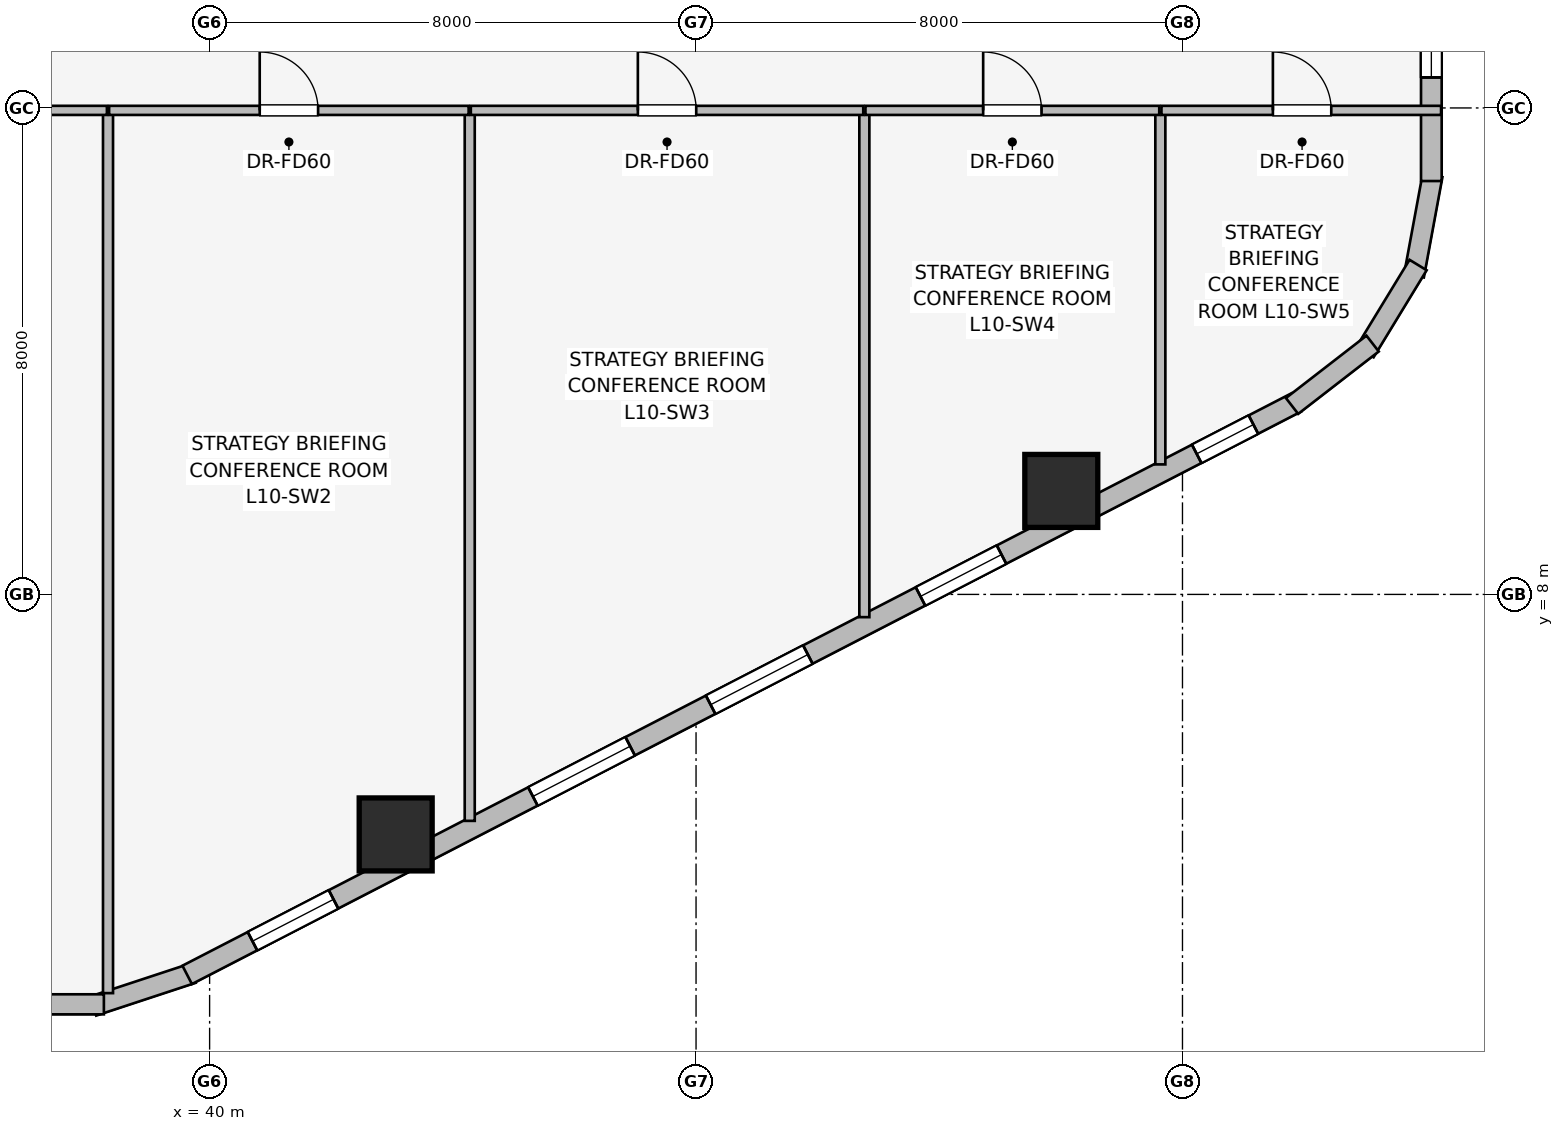
"""IFC4 building model, lengths in metres.
Left out: names, types, materials, properties, quantities, classifications, styles, units other than length and angle.
Written with IfcOpenShell. Run it as: python <this file> out.ifc"""

import sys

from ifc_helpers import new_model, si_unit, direction, frame, frame_2d, origin, origin_2d, place, context, subcontext, project, spatial, rectangle, extrude, element, fill, save


model = new_model("IFC4")
c1 = context("Model", 3, precision=1e-05, world=origin(), true_north=direction((0.0, 1.0)))
c2 = subcontext(c1, "Body", "Model", "MODEL_VIEW")
j1 = project(units=[si_unit("LENGTHUNIT", "METRE"), si_unit("PLANEANGLEUNIT", "RADIAN")], contexts=[c1])
p1 = place(None, origin())
s1 = spatial("IfcSite", under=j1, at=p1, CompositionType="ELEMENT")
p2 = place(p1, origin())
s2 = spatial("IfcBuilding", under=s1, at=p2, CompositionType="ELEMENT")
p3 = place(p2, frame((0.0, 0.0, 41.6)))
s3 = spatial("IfcBuildingStorey", under=s2, at=p3, CompositionType="ELEMENT", Elevation=41.6)
for number, where, z_axis, x_axis in (
    (1, (43.06, 4.053, 0.0), (0.0, 0.0, 1.0), (1.0, 0.0, 0.0)),
    (2, (54.007, 9.702, 0.0), (0.0, 0.0, 1.0), (1.0, 0.0, 0.0)),
):
    element("IfcColumn", number, at=place(p3, frame(where, z_axis=z_axis, x_axis=x_axis)), inside=s3, PredefinedType="COLUMN", context=c2, shape_type="SweptSolid", body=[
        extrude(rectangle(XDim=1.2, YDim=1.2, at=origin_2d()), origin(), (0.0, 0.0, 1.0), 3.65),
    ])
p4 = place(p3, frame((39.719, 1.769, 0.0), z_axis=(0.0, 0.0, 1.0), x_axis=(-0.94976901097, -0.312951794691, 0.0)))
e3 = element("IfcWall", 3, at=p4, inside=s3, PredefinedType="STANDARD", context=c2, shape_type="SweptSolid", body=[
    extrude(rectangle(XDim=1.722, YDim=0.33, at=frame_2d((0.861, 0.0))), origin(), (0.0, 0.0, 1.0), 3.39),
])
p5 = place(p3, frame((38.261, 1.259, 0.0), z_axis=(0.0, 0.0, 1.0), x_axis=(-1.0, 0.0, 0.0)))
e4 = element("IfcWall", 4, at=p5, inside=s3, PredefinedType="STANDARD", context=c2, shape_type="SweptSolid", body=[
    extrude(rectangle(XDim=1.722, YDim=0.33, at=frame_2d((0.861, 0.0))), origin(), (0.0, 0.0, 1.0), 3.39),
])
p6 = place(p3, frame((57.876, 11.159, 0.0), z_axis=(0.0, 0.0, 1.0), x_axis=(-0.888634413993, -0.458616264721, 0.0)))
e5 = element("IfcWall", 5, at=p6, inside=s3, PredefinedType="STANDARD", context=c2, shape_type="SweptSolid", body=[
    extrude(rectangle(XDim=20.531, YDim=0.34, at=frame_2d((10.266, 0.0))), origin(), (0.0, 0.0, 1.0), 2.684),
])
p7 = place(p6, frame((0.798, 0.0, 0.75)))
e6 = element("IfcOpeningElement", 6, at=p7, cuts=e5, PredefinedType="OPENING", context=c2, shape_type="SweptSolid", body=[
    extrude(rectangle(XDim=1.05, YDim=1.4, at=frame_2d((0.525, 0.7))), frame((0.0, 0.18, 0.0), z_axis=(0.0, -1.0, 0.0), x_axis=(1.0, 0.0, 0.0)), (0.0, 0.0, 1.0), 0.36),
])
p8 = place(p6, frame((5.46, 0.0, 0.75)))
e7 = element("IfcOpeningElement", 7, at=p8, cuts=e5, PredefinedType="OPENING", context=c2, shape_type="SweptSolid", body=[
    extrude(rectangle(XDim=1.5, YDim=1.5, at=frame_2d((0.75, 0.75))), frame((0.0, 0.18, 0.0), z_axis=(0.0, -1.0, 0.0), x_axis=(1.0, 0.0, 0.0)), (0.0, 0.0, 1.0), 0.36),
])
p9 = place(p6, frame((9.044, 0.0, 0.75)))
e8 = element("IfcOpeningElement", 8, at=p9, cuts=e5, PredefinedType="OPENING", context=c2, shape_type="SweptSolid", body=[
    extrude(rectangle(XDim=1.8, YDim=1.5, at=frame_2d((0.9, 0.75))), frame((0.0, 0.18, 0.0), z_axis=(0.0, -1.0, 0.0), x_axis=(1.0, 0.0, 0.0)), (0.0, 0.0, 1.0), 0.36),
])
p10 = place(p6, frame((12.333, 0.0, 0.75)))
e9 = element("IfcOpeningElement", 9, at=p10, cuts=e5, PredefinedType="OPENING", context=c2, shape_type="SweptSolid", body=[
    extrude(rectangle(XDim=1.8, YDim=1.5, at=frame_2d((0.9, 0.75))), frame((0.0, 0.18, 0.0), z_axis=(0.0, -1.0, 0.0), x_axis=(1.0, 0.0, 0.0)), (0.0, 0.0, 1.0), 0.36),
])
p11 = place(p6, frame((17.823, 0.0, 0.75)))
e10 = element("IfcOpeningElement", 10, at=p11, cuts=e5, PredefinedType="OPENING", context=c2, shape_type="SweptSolid", body=[
    extrude(rectangle(XDim=1.5, YDim=1.5, at=frame_2d((0.75, 0.75))), frame((0.0, 0.18, 0.0), z_axis=(0.0, -1.0, 0.0), x_axis=(1.0, 0.0, 0.0)), (0.0, 0.0, 1.0), 0.36),
])
p12 = place(p3, frame((60.113, 14.892, 0.0), z_axis=(0.0, 0.0, 1.0), x_axis=(-0.181714143354, -0.983351397063, 0.0)))
e11 = element("IfcWall", 11, at=p12, inside=s3, PredefinedType="STANDARD", context=c2, shape_type="SweptSolid", body=[
    extrude(rectangle(XDim=1.678, YDim=0.33, at=frame_2d((0.839, 0.0))), origin(), (0.0, 0.0, 1.0), 3.39),
])
p13 = place(p3, frame((59.875, 13.417, 0.0), z_axis=(0.0, 0.0, 1.0), x_axis=(-0.520584129191, -0.853810379671, 0.0)))
e12 = element("IfcWall", 12, at=p13, inside=s3, PredefinedType="STANDARD", context=c2, shape_type="SweptSolid", body=[
    extrude(rectangle(XDim=1.677, YDim=0.33, at=frame_2d((0.838, 0.0))), origin(), (0.0, 0.0, 1.0), 3.39),
])
p14 = place(p3, frame((59.127, 12.125, 0.0), z_axis=(0.0, 0.0, 1.0), x_axis=(-0.790691856293, -0.61221433207, 0.0)))
e13 = element("IfcWall", 13, at=p14, inside=s3, PredefinedType="STANDARD", context=c2, shape_type="SweptSolid", body=[
    extrude(rectangle(XDim=1.676, YDim=0.33, at=frame_2d((0.838, 0.0))), origin(), (0.0, 0.0, 1.0), 3.39),
])
p15 = place(p3, frame((60.093, 33.202, 0.0), z_axis=(0.0, 0.0, 1.0), x_axis=(0.0, -1.0, 0.0)))
e14 = element("IfcWall", 14, at=p15, inside=s3, PredefinedType="STANDARD", context=c2, shape_type="SweptSolid", body=[
    extrude(rectangle(XDim=18.404, YDim=0.34, at=frame_2d((9.202, 0.0))), origin(), (0.0, 0.0, 1.0), 2.684),
])
p16 = place(p15, frame((1.744, 0.0, 0.75)))
e15 = element("IfcOpeningElement", 15, at=p16, cuts=e14, PredefinedType="OPENING", context=c2, shape_type="SweptSolid", body=[
    extrude(rectangle(XDim=1.05, YDim=1.4, at=frame_2d((0.525, 0.7))), frame((0.0, 0.18, 0.0), z_axis=(0.0, -1.0, 0.0), x_axis=(1.0, 0.0, 0.0)), (0.0, 0.0, 1.0), 0.36),
])
p17 = place(p15, frame((5.182, 0.0, 0.75)))
e16 = element("IfcOpeningElement", 16, at=p17, cuts=e14, PredefinedType="OPENING", context=c2, shape_type="SweptSolid", body=[
    extrude(rectangle(XDim=1.5, YDim=1.5, at=frame_2d((0.75, 0.75))), frame((0.0, 0.18, 0.0), z_axis=(0.0, -1.0, 0.0), x_axis=(1.0, 0.0, 0.0)), (0.0, 0.0, 1.0), 0.36),
])
p18 = place(p15, frame((9.058, 0.0, 0.75)))
e17 = element("IfcOpeningElement", 17, at=p18, cuts=e14, PredefinedType="OPENING", context=c2, shape_type="SweptSolid", body=[
    extrude(rectangle(XDim=1.8, YDim=1.5, at=frame_2d((0.9, 0.75))), frame((0.0, 0.18, 0.0), z_axis=(0.0, -1.0, 0.0), x_axis=(1.0, 0.0, 0.0)), (0.0, 0.0, 1.0), 0.36),
])
p19 = place(p15, frame((12.704, 0.0, 0.75)))
e18 = element("IfcOpeningElement", 18, at=p19, cuts=e14, PredefinedType="OPENING", context=c2, shape_type="SweptSolid", body=[
    extrude(rectangle(XDim=1.05, YDim=1.4, at=frame_2d((0.525, 0.7))), frame((0.0, 0.18, 0.0), z_axis=(0.0, -1.0, 0.0), x_axis=(1.0, 0.0, 0.0)), (0.0, 0.0, 1.0), 0.36),
])
p20 = place(p15, frame((15.65, 0.0, 0.75)))
e19 = element("IfcOpeningElement", 19, at=p20, cuts=e14, PredefinedType="OPENING", context=c2, shape_type="SweptSolid", body=[
    extrude(rectangle(XDim=1.05, YDim=1.4, at=frame_2d((0.525, 0.7))), frame((0.0, 0.18, 0.0), z_axis=(0.0, -1.0, 0.0), x_axis=(1.0, 0.0, 0.0)), (0.0, 0.0, 1.0), 0.36),
])
p21 = place(p3, frame((38.329, 1.443, 0.0), z_axis=(0.0, 0.0, 1.0), x_axis=(0.0, 1.0, 0.0)))
e20 = element("IfcWall", 20, at=p21, inside=s3, PredefinedType="PARTITIONING", context=c2, shape_type="SweptSolid", body=[
    extrude(rectangle(XDim=14.487, YDim=0.165, at=frame_2d((7.243, 0.0))), origin(), (0.0, 0.0, 1.0), 3.39),
])
p22 = place(p3, frame((44.278, 4.276, 0.0), z_axis=(0.0, 0.0, 1.0), x_axis=(0.0, 1.0, 0.0)))
e21 = element("IfcWall", 21, at=p22, inside=s3, PredefinedType="PARTITIONING", context=c2, shape_type="SweptSolid", body=[
    extrude(rectangle(XDim=11.654, YDim=0.165, at=frame_2d((5.827, 0.0))), origin(), (0.0, 0.0, 1.0), 3.39),
])
p23 = place(p3, frame((50.768, 7.626, 0.0), z_axis=(0.0, 0.0, 1.0), x_axis=(0.0, 1.0, 0.0)))
e22 = element("IfcWall", 22, at=p23, inside=s3, PredefinedType="PARTITIONING", context=c2, shape_type="SweptSolid", body=[
    extrude(rectangle(XDim=8.304, YDim=0.165, at=frame_2d((4.152, 0.0))), origin(), (0.0, 0.0, 1.0), 3.39),
])
p24 = place(p3, frame((55.636, 10.138, 0.0), z_axis=(0.0, 0.0, 1.0), x_axis=(0.0, 1.0, 0.0)))
e23 = element("IfcWall", 23, at=p24, inside=s3, PredefinedType="PARTITIONING", context=c2, shape_type="SweptSolid", body=[
    extrude(rectangle(XDim=5.792, YDim=0.165, at=frame_2d((2.896, 0.0))), origin(), (0.0, 0.0, 1.0), 3.39),
])
p25 = place(p3, frame((32.85, 15.96, 0.0), z_axis=(0.0, 0.0, 1.0), x_axis=(1.0, 0.0, 0.0)))
e24 = element("IfcWall", 24, at=p25, inside=s3, PredefinedType="PARTITIONING", context=c2, shape_type="SweptSolid", body=[
    extrude(rectangle(XDim=5.461, YDim=0.15, at=frame_2d((2.73, 0.0))), origin(), (0.0, 0.0, 1.0), 3.39),
])
p26 = place(p25, frame((2.251, 0.0, 0.0)))
e25 = element("IfcOpeningElement", 25, at=p26, cuts=e24, PredefinedType="OPENING", context=c2, shape_type="SweptSolid", body=[
    extrude(rectangle(XDim=0.96, YDim=2.0, at=frame_2d((0.48, 1.0))), frame((0.0, 0.085, 0.0), z_axis=(0.0, -1.0, 0.0), x_axis=(1.0, 0.0, 0.0)), (0.0, 0.0, 1.0), 0.17),
])
p27 = place(p3, frame((38.347, 15.96, 0.0), z_axis=(0.0, 0.0, 1.0), x_axis=(1.0, 0.0, 0.0)))
e26 = element("IfcWall", 26, at=p27, inside=s3, PredefinedType="PARTITIONING", context=c2, shape_type="SweptSolid", body=[
    extrude(rectangle(XDim=5.913, YDim=0.15, at=frame_2d((2.957, 0.0))), origin(), (0.0, 0.0, 1.0), 3.39),
])
p28 = place(p27, frame((2.477, 0.0, 0.0)))
e27 = element("IfcOpeningElement", 27, at=p28, cuts=e26, PredefinedType="OPENING", context=c2, shape_type="SweptSolid", body=[
    extrude(rectangle(XDim=0.96, YDim=2.0, at=frame_2d((0.48, 1.0))), frame((0.0, 0.085, 0.0), z_axis=(0.0, -1.0, 0.0), x_axis=(1.0, 0.0, 0.0)), (0.0, 0.0, 1.0), 0.17),
])
p29 = place(p3, frame((44.296, 15.96, 0.0), z_axis=(0.0, 0.0, 1.0), x_axis=(1.0, 0.0, 0.0)))
e28 = element("IfcWall", 28, at=p29, inside=s3, PredefinedType="PARTITIONING", context=c2, shape_type="SweptSolid", body=[
    extrude(rectangle(XDim=6.454, YDim=0.15, at=frame_2d((3.227, 0.0))), origin(), (0.0, 0.0, 1.0), 3.39),
])
p30 = place(p29, frame((2.747, 0.0, 0.0)))
e29 = element("IfcOpeningElement", 29, at=p30, cuts=e28, PredefinedType="OPENING", context=c2, shape_type="SweptSolid", body=[
    extrude(rectangle(XDim=0.96, YDim=2.0, at=frame_2d((0.48, 1.0))), frame((0.0, 0.085, 0.0), z_axis=(0.0, -1.0, 0.0), x_axis=(1.0, 0.0, 0.0)), (0.0, 0.0, 1.0), 0.17),
])
p31 = place(p3, frame((50.786, 15.96, 0.0), z_axis=(0.0, 0.0, 1.0), x_axis=(1.0, 0.0, 0.0)))
e30 = element("IfcWall", 30, at=p31, inside=s3, PredefinedType="PARTITIONING", context=c2, shape_type="SweptSolid", body=[
    extrude(rectangle(XDim=4.832, YDim=0.15, at=frame_2d((2.416, 0.0))), origin(), (0.0, 0.0, 1.0), 3.39),
])
p32 = place(p31, frame((1.936, 0.0, 0.0)))
e31 = element("IfcOpeningElement", 31, at=p32, cuts=e30, PredefinedType="OPENING", context=c2, shape_type="SweptSolid", body=[
    extrude(rectangle(XDim=0.96, YDim=2.0, at=frame_2d((0.48, 1.0))), frame((0.0, 0.085, 0.0), z_axis=(0.0, -1.0, 0.0), x_axis=(1.0, 0.0, 0.0)), (0.0, 0.0, 1.0), 0.17),
])
p33 = place(p3, frame((55.654, 15.96, 0.0), z_axis=(0.0, 0.0, 1.0), x_axis=(1.0, 0.0, 0.0)))
e32 = element("IfcWall", 32, at=p33, inside=s3, PredefinedType="PARTITIONING", context=c2, shape_type="SweptSolid", body=[
    extrude(rectangle(XDim=4.599, YDim=0.15, at=frame_2d((2.299, 0.0))), origin(), (0.0, 0.0, 1.0), 3.39),
])
p34 = place(p33, frame((1.833, 0.0, 0.0)))
e33 = element("IfcOpeningElement", 33, at=p34, cuts=e32, PredefinedType="OPENING", context=c2, shape_type="SweptSolid", body=[
    extrude(rectangle(XDim=0.96, YDim=2.0, at=frame_2d((0.48, 1.0))), frame((0.0, 0.085, 0.0), z_axis=(0.0, -1.0, 0.0), x_axis=(1.0, 0.0, 0.0)), (0.0, 0.0, 1.0), 0.17),
])
p35 = place(p7, origin())
e34 = element("IfcWindow", 34, at=p35, inside=s3, PartitioningType="SINGLE_PANEL", PredefinedType="WINDOW", context=c2, shape_type="SweptSolid", body=[
    extrude(rectangle(XDim=1.05, YDim=1.4, at=frame_2d((0.525, 0.7))), frame((0.0, 0.03, 0.0), z_axis=(0.0, -1.0, 0.0), x_axis=(1.0, 0.0, 0.0)), (0.0, 0.0, 1.0), 0.06),
])
fill(e6, e34)
p36 = place(p8, origin())
e35 = element("IfcWindow", 35, at=p36, inside=s3, PartitioningType="SINGLE_PANEL", PredefinedType="WINDOW", context=c2, shape_type="SweptSolid", body=[
    extrude(rectangle(XDim=1.5, YDim=1.5, at=frame_2d((0.75, 0.75))), frame((0.0, 0.03, 0.0), z_axis=(0.0, -1.0, 0.0), x_axis=(1.0, 0.0, 0.0)), (0.0, 0.0, 1.0), 0.06),
])
fill(e7, e35)
p37 = place(p9, origin())
e36 = element("IfcWindow", 36, at=p37, inside=s3, PartitioningType="SINGLE_PANEL", PredefinedType="WINDOW", context=c2, shape_type="SweptSolid", body=[
    extrude(rectangle(XDim=1.8, YDim=1.5, at=frame_2d((0.9, 0.75))), frame((0.0, 0.03, 0.0), z_axis=(0.0, -1.0, 0.0), x_axis=(1.0, 0.0, 0.0)), (0.0, 0.0, 1.0), 0.06),
])
fill(e8, e36)
p38 = place(p10, origin())
e37 = element("IfcWindow", 37, at=p38, inside=s3, PartitioningType="SINGLE_PANEL", PredefinedType="WINDOW", context=c2, shape_type="SweptSolid", body=[
    extrude(rectangle(XDim=1.8, YDim=1.5, at=frame_2d((0.9, 0.75))), frame((0.0, 0.03, 0.0), z_axis=(0.0, -1.0, 0.0), x_axis=(1.0, 0.0, 0.0)), (0.0, 0.0, 1.0), 0.06),
])
fill(e9, e37)
p39 = place(p11, origin())
e38 = element("IfcWindow", 38, at=p39, inside=s3, PartitioningType="SINGLE_PANEL", PredefinedType="WINDOW", context=c2, shape_type="SweptSolid", body=[
    extrude(rectangle(XDim=1.5, YDim=1.5, at=frame_2d((0.75, 0.75))), frame((0.0, 0.03, 0.0), z_axis=(0.0, -1.0, 0.0), x_axis=(1.0, 0.0, 0.0)), (0.0, 0.0, 1.0), 0.06),
])
fill(e10, e38)
p40 = place(p20, origin())
e39 = element("IfcWindow", 39, at=p40, inside=s3, PartitioningType="SINGLE_PANEL", PredefinedType="WINDOW", context=c2, shape_type="SweptSolid", body=[
    extrude(rectangle(XDim=1.05, YDim=1.4, at=frame_2d((0.525, 0.7))), frame((0.0, 0.03, 0.0), z_axis=(0.0, -1.0, 0.0), x_axis=(1.0, 0.0, 0.0)), (0.0, 0.0, 1.0), 0.06),
])
fill(e19, e39)
p41 = place(p28, origin())
e40 = element("IfcDoor", 40, at=p41, inside=s3, OperationType="SINGLE_SWING_LEFT", PredefinedType="DOOR", context=c2, shape_type="SweptSolid", body=[
    extrude(rectangle(XDim=0.96, YDim=2.0, at=frame_2d((0.48, 1.0))), frame((0.0, 0.025, 0.0), z_axis=(0.0, -1.0, 0.0), x_axis=(1.0, 0.0, 0.0)), (0.0, 0.0, 1.0), 0.05),
])
fill(e27, e40)
p42 = place(p30, origin())
e41 = element("IfcDoor", 41, at=p42, inside=s3, OperationType="SINGLE_SWING_LEFT", PredefinedType="DOOR", context=c2, shape_type="SweptSolid", body=[
    extrude(rectangle(XDim=0.96, YDim=2.0, at=frame_2d((0.48, 1.0))), frame((0.0, 0.025, 0.0), z_axis=(0.0, -1.0, 0.0), x_axis=(1.0, 0.0, 0.0)), (0.0, 0.0, 1.0), 0.05),
])
fill(e29, e41)
p43 = place(p32, origin())
e42 = element("IfcDoor", 42, at=p43, inside=s3, OperationType="SINGLE_SWING_LEFT", PredefinedType="DOOR", context=c2, shape_type="SweptSolid", body=[
    extrude(rectangle(XDim=0.96, YDim=2.0, at=frame_2d((0.48, 1.0))), frame((0.0, 0.025, 0.0), z_axis=(0.0, -1.0, 0.0), x_axis=(1.0, 0.0, 0.0)), (0.0, 0.0, 1.0), 0.05),
])
fill(e31, e42)
p44 = place(p34, origin())
e43 = element("IfcDoor", 43, at=p44, inside=s3, OperationType="SINGLE_SWING_LEFT", PredefinedType="DOOR", context=c2, shape_type="SweptSolid", body=[
    extrude(rectangle(XDim=0.96, YDim=2.0, at=frame_2d((0.48, 1.0))), frame((0.0, 0.025, 0.0), z_axis=(0.0, -1.0, 0.0), x_axis=(1.0, 0.0, 0.0)), (0.0, 0.0, 1.0), 0.05),
])
fill(e33, e43)
save(model, sys.argv[1])
